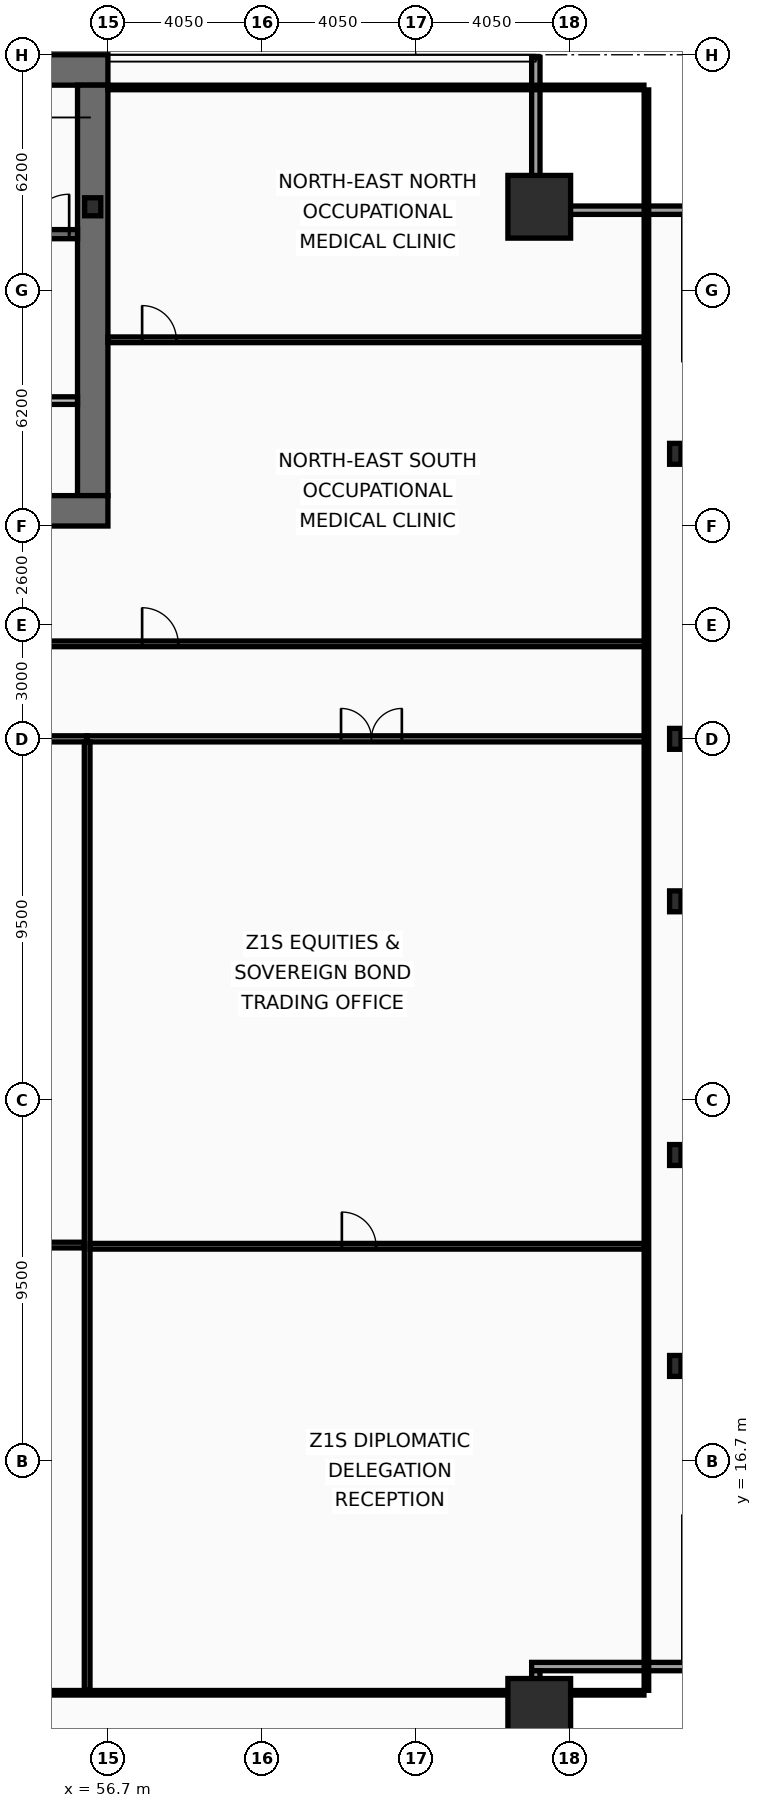
"""IFC4 building model, lengths in metres.
Left out: names, types, materials, properties, quantities, classifications, styles, units other than length and angle.
Written with IfcOpenShell. Run it as: python <this file> out.ifc"""

import sys

from ifc_helpers import new_model, si_unit, direction, frame, frame_2d, origin, origin_2d, place, context, subcontext, project, spatial, rectangle, hollow_rectangle, i_section, extrude, element, fill, save


model = new_model("IFC4")
c1 = context("Model", 3, precision=1e-05, world=origin(), true_north=direction((0.0, 1.0)))
c2 = subcontext(c1, "Body", "Model", "MODEL_VIEW")
j1 = project(units=[si_unit("LENGTHUNIT", "METRE"), si_unit("PLANEANGLEUNIT", "RADIAN")], contexts=[c1])
p1 = place(None, origin())
s1 = spatial("IfcSite", under=j1, at=p1, CompositionType="ELEMENT")
p2 = place(p1, origin())
s2 = spatial("IfcBuilding", under=s1, at=p2, CompositionType="ELEMENT")
p3 = place(p2, frame((0.0, 0.0, 73.8)))
s3 = spatial("IfcBuildingStorey", under=s2, at=p3, CompositionType="ELEMENT", Elevation=73.8)
p4 = place(p3, frame((16.2, 53.3, 0.0), z_axis=(0.0, 0.0, 1.0), x_axis=(1.0, 0.0, 0.0)))
e1 = element("IfcWall", 1, at=p4, inside=s3, PredefinedType="SHEAR", context=c2, shape_type="SweptSolid", body=[
    extrude(rectangle(XDim=40.5, YDim=0.8, at=frame_2d((20.25, 0.0))), origin(), (0.0, 0.0, 1.0), 3.82),
])
p5 = place(p3, frame((56.3, 52.9, 0.0), z_axis=(0.0, 0.0, 1.0), x_axis=(0.0, -1.0, 0.0)))
e2 = element("IfcWall", 2, at=p5, inside=s3, PredefinedType="SHEAR", context=c2, shape_type="SweptSolid", body=[
    extrude(rectangle(XDim=10.8, YDim=0.8, at=frame_2d((5.4, 0.0))), origin(), (0.0, 0.0, 1.0), 3.82),
])
p6 = place(p3, frame((56.7, 41.7, 0.0), z_axis=(0.0, 0.0, 1.0), x_axis=(-1.0, 0.0, 0.0)))
e3 = element("IfcWall", 3, at=p6, inside=s3, PredefinedType="SHEAR", context=c2, shape_type="SweptSolid", body=[
    extrude(rectangle(XDim=2.45, YDim=0.8, at=frame_2d((1.225, 0.0))), origin(), (0.0, 0.0, 1.0), 3.82),
])
p7 = place(p3, frame((48.63, 48.98, 0.0), z_axis=(0.0, 0.0, 1.0), x_axis=(1.0, 0.0, 0.0)))
e4 = element("IfcWall", 4, at=p7, inside=s3, PredefinedType="SHEAR", context=c2, shape_type="SweptSolid", body=[
    extrude(rectangle(XDim=7.27, YDim=0.24, at=frame_2d((3.635, 0.0))), origin(), (0.0, 0.0, 1.0), 3.82),
])
p8 = place(p7, frame((6.0, 0.0, 0.0)))
e5 = element("IfcOpeningElement", 5, at=p8, cuts=e4, PredefinedType="OPENING", context=c2, shape_type="SweptSolid", body=[
    extrude(rectangle(XDim=1.05, YDim=2.15, at=frame_2d((0.525, 1.075))), frame((0.0, 0.13, 0.0), z_axis=(0.0, -1.0, 0.0), x_axis=(1.0, 0.0, 0.0)), (0.0, 0.0, 1.0), 0.26),
])
for number, where, z_axis, x_axis in (
    (6, (68.05, 10.15, 0.0), (0.0, 0.0, 1.0), (1.0, 0.0, 0.0)),
    (7, (68.05, 49.7, 0.0), (0.0, 0.0, 1.0), (1.0, 0.0, 0.0)),
):
    element("IfcColumn", number, at=place(p3, frame(where, z_axis=z_axis, x_axis=x_axis)), inside=s3, PredefinedType="COLUMN", context=c2, shape_type="SweptSolid", body=[
        extrude(hollow_rectangle(XDim=1.65, YDim=1.65, WallThickness=0.075, at=origin_2d()), origin(), (0.0, 0.0, 1.0), 4.0),
    ])
for number, where, z_axis, x_axis in (
    (8, (71.63, 19.2, 0.0), (0.0, 0.0, 1.0), (1.0, 0.0, 0.0)),
    (9, (71.63, 24.75, 0.0), (0.0, 0.0, 1.0), (1.0, 0.0, 0.0)),
    (10, (71.63, 31.425, 0.0), (0.0, 0.0, 1.0), (1.0, 0.0, 0.0)),
    (11, (71.63, 35.7, 0.0), (0.0, 0.0, 1.0), (1.0, 0.0, 0.0)),
    (12, (71.63, 43.2, 0.0), (0.0, 0.0, 1.0), (1.0, 0.0, 0.0)),
):
    element("IfcColumn", number, at=place(p3, frame(where, z_axis=z_axis, x_axis=x_axis)), inside=s3, PredefinedType="COLUMN", context=c2, shape_type="SweptSolid", body=[
        extrude(i_section(OverallWidth=0.3, OverallDepth=0.55, WebThickness=0.015, FlangeThickness=0.029, at=origin_2d()), origin(), (0.0, 0.0, 1.0), 4.0),
    ])
p9 = place(p3, frame((56.3, 49.7, 0.0), z_axis=(0.0, 0.0, 1.0), x_axis=(1.0, 0.0, 0.0)))
e13 = element("IfcColumn", 13, at=p9, inside=s3, PredefinedType="COLUMN", context=c2, shape_type="SweptSolid", body=[
    extrude(i_section(OverallWidth=0.424, OverallDepth=0.474, WebThickness=0.048, FlangeThickness=0.077, at=origin_2d()), origin(), (0.0, 0.0, 1.0), 4.0),
])
p10 = place(p3, frame((67.96, 53.63, 0.0), z_axis=(0.0, 0.0, 1.0), x_axis=(0.0, -1.0, 0.0)))
e14 = element("IfcWall", 14, at=p10, inside=s3, PredefinedType="SOLIDWALL", context=c2, shape_type="SweptSolid", body=[
    extrude(rectangle(XDim=3.91, YDim=0.22, at=frame_2d((1.955, 0.0))), origin(), (0.0, 0.0, 1.0), 3.16),
])
for number, where, z_axis, x_axis in (
    (15, (67.85, 49.61, 0.0), (0.0, 0.0, 1.0), (1.0, 0.0, 0.0)),
    (16, (72.07, 11.29, 0.0), (0.0, 0.0, 1.0), (-1.0, 0.0, 0.0)),
):
    element("IfcWall", number, at=place(p3, frame(where, z_axis=z_axis, x_axis=x_axis)), inside=s3, PredefinedType="SOLIDWALL", context=c2, shape_type="SweptSolid", body=[
        extrude(rectangle(XDim=4.22, YDim=0.22, at=frame_2d((2.11, 0.0))), origin(), (0.0, 0.0, 1.0), 3.16),
    ])
p11 = place(p3, frame((67.96, 11.18, 0.0), z_axis=(0.0, 0.0, 1.0), x_axis=(0.0, -1.0, 0.0)))
e17 = element("IfcWall", 17, at=p11, inside=s3, PredefinedType="SOLIDWALL", context=c2, shape_type="SweptSolid", body=[
    extrude(rectangle(XDim=3.91, YDim=0.22, at=frame_2d((1.955, 0.0))), origin(), (0.0, 0.0, 1.0), 3.16),
])
p12 = place(p3, frame((51.9, 44.6, 0.0), z_axis=(0.0, 0.0, 1.0), x_axis=(1.0, 0.0, 0.0)))
e18 = element("IfcWall", 18, at=p12, inside=s3, PredefinedType="PARTITIONING", context=c2, shape_type="SweptSolid", body=[
    extrude(rectangle(XDim=4.0, YDim=0.2, at=frame_2d((2.0, 0.0))), origin(), (0.0, 0.0, 1.0), 3.82),
])
p13 = place(p12, frame((1.15, 0.0, 0.0)))
e19 = element("IfcOpeningElement", 19, at=p13, cuts=e18, PredefinedType="OPENING", context=c2, shape_type="SweptSolid", body=[
    extrude(rectangle(XDim=1.05, YDim=2.15, at=frame_2d((0.525, 1.075))), frame((0.0, 0.11, 0.0), z_axis=(0.0, -1.0, 0.0), x_axis=(1.0, 0.0, 0.0)), (0.0, 0.0, 1.0), 0.22),
])
p14 = place(p3, frame((54.35, 38.2, 0.0), z_axis=(0.0, 0.0, 1.0), x_axis=(1.0, 0.0, 0.0)))
e20 = element("IfcWall", 20, at=p14, inside=s3, PredefinedType="PARTITIONING", context=c2, shape_type="SweptSolid", body=[
    extrude(rectangle(XDim=16.52, YDim=0.15, at=frame_2d((8.26, 0.0))), origin(), (0.0, 0.0, 1.0), 3.01),
])
p15 = place(p14, frame((3.25, 0.0, 0.0)))
e21 = element("IfcOpeningElement", 21, at=p15, cuts=e20, PredefinedType="OPENING", context=c2, shape_type="SweptSolid", body=[
    extrude(rectangle(XDim=0.95, YDim=2.05, at=frame_2d((0.475, 1.025))), frame((0.0, 0.085, 0.0), z_axis=(0.0, -1.0, 0.0), x_axis=(1.0, 0.0, 0.0)), (0.0, 0.0, 1.0), 0.17),
])
p16 = place(p3, frame((56.7, 46.2, 0.0), z_axis=(0.0, 0.0, 1.0), x_axis=(1.0, 0.0, 0.0)))
e22 = element("IfcWall", 22, at=p16, inside=s3, PredefinedType="PARTITIONING", context=c2, shape_type="SweptSolid", body=[
    extrude(rectangle(XDim=14.105, YDim=0.15, at=frame_2d((7.052, 0.0))), origin(), (0.0, 0.0, 1.0), 3.16),
])
p17 = place(p16, frame((0.9, 0.0, 0.0)))
e23 = element("IfcOpeningElement", 23, at=p17, cuts=e22, PredefinedType="OPENING", context=c2, shape_type="SweptSolid", body=[
    extrude(rectangle(XDim=0.9, YDim=2.05, at=frame_2d((0.45, 1.025))), frame((0.0, 0.085, 0.0), z_axis=(0.0, -1.0, 0.0), x_axis=(1.0, 0.0, 0.0)), (0.0, 0.0, 1.0), 0.17),
])
p18 = place(p3, frame((41.408, 35.7, 0.0), z_axis=(0.0, 0.0, 1.0), x_axis=(1.0, 0.0, 0.0)))
e24 = element("IfcWall", 24, at=p18, inside=s3, PredefinedType="PARTITIONING", context=c2, shape_type="SweptSolid", body=[
    extrude(rectangle(XDim=14.745, YDim=0.16, at=frame_2d((7.373, 0.0))), origin(), (0.0, 0.0, 1.0), 3.01),
])
p19 = place(p18, frame((7.193, 0.0, 0.0)))
e25 = element("IfcOpeningElement", 25, at=p19, cuts=e24, PredefinedType="OPENING", context=c2, shape_type="SweptSolid", body=[
    extrude(rectangle(XDim=1.6, YDim=2.15, at=frame_2d((0.8, 1.075))), frame((0.0, 0.09, 0.0), z_axis=(0.0, -1.0, 0.0), x_axis=(1.0, 0.0, 0.0)), (0.0, 0.0, 1.0), 0.18),
])
p20 = place(p3, frame((41.488, 22.38, 0.0), z_axis=(0.0, 0.0, 1.0), x_axis=(1.0, 0.0, 0.0)))
e26 = element("IfcWall", 26, at=p20, inside=s3, PredefinedType="PARTITIONING", context=c2, shape_type="SweptSolid", body=[
    extrude(rectangle(XDim=14.585, YDim=0.15, at=frame_2d((7.292, 0.0))), origin(), (0.0, 0.0, 1.0), 3.01),
])
p21 = place(p20, frame((6.635, 0.0, 0.0)))
e27 = element("IfcOpeningElement", 27, at=p21, cuts=e26, PredefinedType="OPENING", context=c2, shape_type="SweptSolid", body=[
    extrude(rectangle(XDim=0.9, YDim=2.05, at=frame_2d((0.45, 1.025))), frame((0.0, 0.085, 0.0), z_axis=(0.0, -1.0, 0.0), x_axis=(1.0, 0.0, 0.0)), (0.0, 0.0, 1.0), 0.17),
])
p22 = place(p3, frame((56.154, 35.7, 0.0), z_axis=(0.0, 0.0, 1.0), x_axis=(1.0, 0.0, 0.0)))
e28 = element("IfcWall", 28, at=p22, inside=s3, PredefinedType="PARTITIONING", context=c2, shape_type="SweptSolid", body=[
    extrude(rectangle(XDim=14.717, YDim=0.16, at=frame_2d((7.358, 0.0))), origin(), (0.0, 0.0, 1.0), 3.01),
])
p23 = place(p22, frame((6.681, 0.0, 0.0)))
e29 = element("IfcOpeningElement", 29, at=p23, cuts=e28, PredefinedType="OPENING", context=c2, shape_type="SweptSolid", body=[
    extrude(rectangle(XDim=1.6, YDim=2.15, at=frame_2d((0.8, 1.075))), frame((0.0, 0.09, 0.0), z_axis=(0.0, -1.0, 0.0), x_axis=(1.0, 0.0, 0.0)), (0.0, 0.0, 1.0), 0.18),
])
p24 = place(p3, frame((56.154, 10.665, 0.0), z_axis=(0.0, 0.0, 1.0), x_axis=(0.0, 1.0, 0.0)))
e30 = element("IfcWall", 30, at=p24, inside=s3, PredefinedType="PARTITIONING", context=c2, shape_type="SweptSolid", body=[
    extrude(rectangle(XDim=24.95, YDim=0.15, at=frame_2d((12.475, 0.0))), origin(), (0.0, 0.0, 1.0), 3.01),
])
p25 = place(p3, frame((56.233, 22.349, 0.0), z_axis=(0.0, 0.0, 1.0), x_axis=(1.0, 0.0, 0.0)))
e31 = element("IfcWall", 31, at=p25, inside=s3, PredefinedType="PARTITIONING", context=c2, shape_type="SweptSolid", body=[
    extrude(rectangle(XDim=14.572, YDim=0.15, at=frame_2d((7.286, 0.0))), origin(), (0.0, 0.0, 1.0), 3.82),
])
p26 = place(p25, frame((6.622, 0.0, 0.0)))
e32 = element("IfcOpeningElement", 32, at=p26, cuts=e31, PredefinedType="OPENING", context=c2, shape_type="SweptSolid", body=[
    extrude(rectangle(XDim=0.9, YDim=2.05, at=frame_2d((0.45, 1.025))), frame((0.0, 0.085, 0.0), z_axis=(0.0, -1.0, 0.0), x_axis=(1.0, 0.0, 0.0)), (0.0, 0.0, 1.0), 0.17),
])
p27 = place(p3, frame((70.87, 10.665, 0.0), z_axis=(0.0, 0.0, 1.0), x_axis=(0.0, 1.0, 0.0)))
e33 = element("IfcWall", 33, at=p27, inside=s3, PredefinedType="PARTITIONING", context=c2, shape_type="SweptSolid", body=[
    extrude(rectangle(XDim=42.11, YDim=0.12, at=frame_2d((21.055, 0.0))), origin(), (0.0, 0.0, 1.0), 3.01),
])
p28 = place(p3, frame((56.7, 52.84, 0.0), z_axis=(0.0, 0.0, 1.0), x_axis=(1.0, 0.0, 0.0)))
e34 = element("IfcWall", 34, at=p28, inside=s3, PredefinedType="PARTITIONING", context=c2, shape_type="SweptSolid", body=[
    extrude(rectangle(XDim=14.105, YDim=0.12, at=frame_2d((7.052, 0.0))), origin(), (0.0, 0.0, 1.0), 3.82),
])
p29 = place(p3, frame((2.095, 10.6, 0.0), z_axis=(0.0, 0.0, 1.0), x_axis=(1.0, 0.0, 0.0)))
e35 = element("IfcWall", 35, at=p29, inside=s3, PredefinedType="PARTITIONING", context=c2, shape_type="SweptSolid", body=[
    extrude(rectangle(XDim=68.71, YDim=0.12, at=frame_2d((34.355, 0.0))), origin(), (0.0, 0.0, 1.0), 3.01),
])
p30 = place(p8, origin())
e36 = element("IfcDoor", 36, at=p30, inside=s3, OperationType="SINGLE_SWING_RIGHT", PredefinedType="DOOR", context=c2, shape_type="SweptSolid", body=[
    extrude(rectangle(XDim=1.05, YDim=2.15, at=frame_2d((0.525, 1.075))), frame((0.0, 0.025, 0.0), z_axis=(0.0, -1.0, 0.0), x_axis=(1.0, 0.0, 0.0)), (0.0, 0.0, 1.0), 0.05),
])
fill(e5, e36)
p31 = place(p15, origin())
e37 = element("IfcDoor", 37, at=p31, inside=s3, OperationType="SINGLE_SWING_LEFT", PredefinedType="DOOR", context=c2, shape_type="SweptSolid", body=[
    extrude(rectangle(XDim=0.95, YDim=2.05, at=frame_2d((0.475, 1.025))), frame((0.0, 0.025, 0.0), z_axis=(0.0, -1.0, 0.0), x_axis=(1.0, 0.0, 0.0)), (0.0, 0.0, 1.0), 0.05),
])
fill(e21, e37)
p32 = place(p17, origin())
e38 = element("IfcDoor", 38, at=p32, inside=s3, OperationType="SINGLE_SWING_LEFT", PredefinedType="DOOR", context=c2, shape_type="SweptSolid", body=[
    extrude(rectangle(XDim=0.9, YDim=2.05, at=frame_2d((0.45, 1.025))), frame((0.0, 0.025, 0.0), z_axis=(0.0, -1.0, 0.0), x_axis=(1.0, 0.0, 0.0)), (0.0, 0.0, 1.0), 0.05),
])
fill(e23, e38)
p33 = place(p23, origin())
e39 = element("IfcDoor", 39, at=p33, inside=s3, OperationType="DOUBLE_DOOR_SINGLE_SWING", PredefinedType="DOOR", context=c2, shape_type="SweptSolid", body=[
    extrude(rectangle(XDim=1.6, YDim=2.15, at=frame_2d((0.8, 1.075))), frame((0.0, 0.025, 0.0), z_axis=(0.0, -1.0, 0.0), x_axis=(1.0, 0.0, 0.0)), (0.0, 0.0, 1.0), 0.05),
])
fill(e29, e39)
p34 = place(p26, origin())
e40 = element("IfcDoor", 40, at=p34, inside=s3, OperationType="SINGLE_SWING_LEFT", PredefinedType="DOOR", context=c2, shape_type="SweptSolid", body=[
    extrude(rectangle(XDim=0.9, YDim=2.05, at=frame_2d((0.45, 1.025))), frame((0.0, 0.025, 0.0), z_axis=(0.0, -1.0, 0.0), x_axis=(1.0, 0.0, 0.0)), (0.0, 0.0, 1.0), 0.05),
])
fill(e32, e40)
save(model, sys.argv[1])
